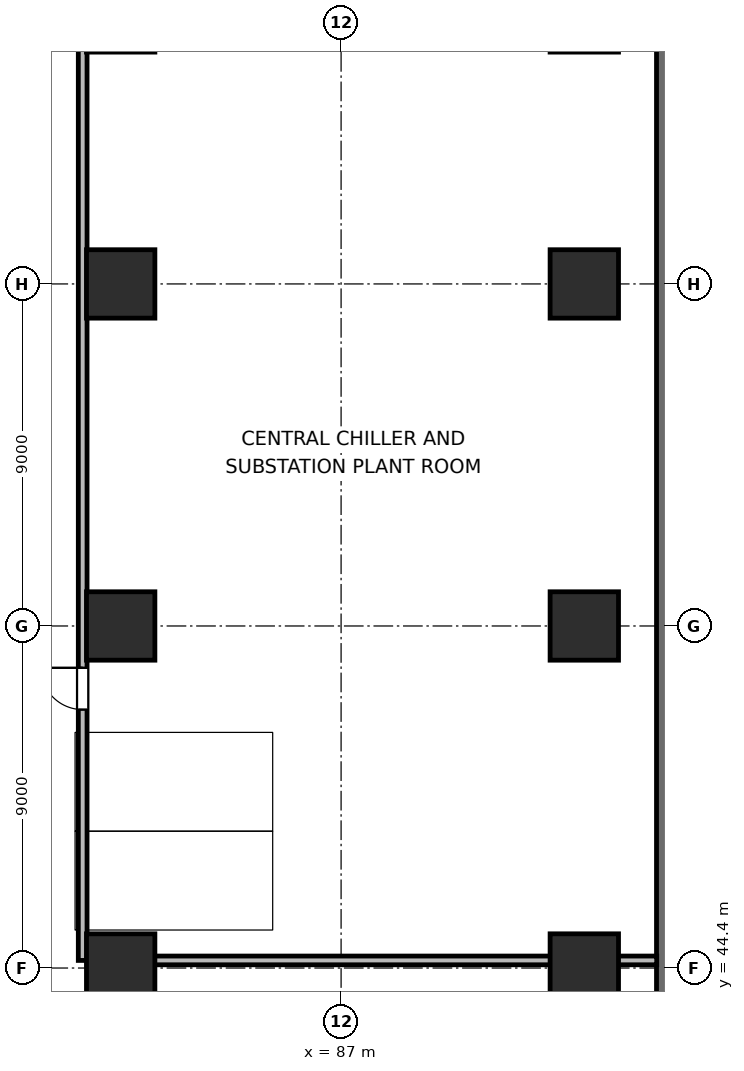
"""IFC4 building model, lengths in metres.
Left out: names, types, materials, properties, quantities, classifications, styles, units other than length and angle.
Written with IfcOpenShell. Run it as: python <this file> out.ifc"""

import sys

from ifc_helpers import new_model, si_unit, direction, frame, frame_2d, origin, origin_2d, place, context, subcontext, project, spatial, rectangle, extrude, element, fill, save


model = new_model("IFC4")
c1 = context("Model", 3, precision=1e-05, world=origin(), true_north=direction((0.0, 1.0)))
c2 = subcontext(c1, "Body", "Model", "MODEL_VIEW")
j1 = project(units=[si_unit("LENGTHUNIT", "METRE"), si_unit("PLANEANGLEUNIT", "RADIAN")], contexts=[c1])
p1 = place(None, origin())
s1 = spatial("IfcSite", under=j1, at=p1, CompositionType="ELEMENT")
p2 = place(p1, origin())
s2 = spatial("IfcBuilding", under=s1, at=p2, CompositionType="ELEMENT")
p3 = place(p2, frame((0.0, 0.0, -9.0)))
s3 = spatial("IfcBuildingStorey", under=s2, at=p3, CompositionType="ELEMENT", Elevation=-9.0)
p4 = place(p3, frame((95.65, 0.7, 0.0), z_axis=(0.0, 0.0, 1.0), x_axis=(0.0, 1.0, 0.0)))
e1 = element("IfcWall", 1, at=p4, inside=s3, PredefinedType="SOLIDWALL", context=c2, shape_type="SweptSolid", body=[
    extrude(rectangle(XDim=70.6, YDim=0.7, at=frame_2d((35.3, 0.0))), origin(), (0.0, 0.0, 1.0), 4.5),
])
for number, where, z_axis, x_axis in (
    (2, (81.2, 44.4, 0.0), (0.0, 0.0, 1.0), (1.0, 0.0, 0.0)),
    (3, (81.2, 53.4, 0.0), (0.0, 0.0, 1.0), (1.0, 0.0, 0.0)),
    (4, (81.2, 62.4, 0.0), (0.0, 0.0, 1.0), (1.0, 0.0, 0.0)),
    (5, (81.2, 69.4, 0.0), (0.0, 0.0, 1.0), (1.0, 0.0, 0.0)),
    (6, (93.4, 44.4, 0.0), (0.0, 0.0, 1.0), (1.0, 0.0, 0.0)),
    (7, (93.4, 53.4, 0.0), (0.0, 0.0, 1.0), (1.0, 0.0, 0.0)),
    (8, (93.4, 62.4, 0.0), (0.0, 0.0, 1.0), (1.0, 0.0, 0.0)),
    (9, (93.4, 69.4, 0.0), (0.0, 0.0, 1.0), (1.0, 0.0, 0.0)),
):
    element("IfcColumn", number, at=place(p3, frame(where, z_axis=z_axis, x_axis=x_axis)), inside=s3, PredefinedType="COLUMN", context=c2, shape_type="SweptSolid", body=[
        extrude(rectangle(XDim=1.8, YDim=1.8, at=origin_2d()), origin(), (0.0, 0.0, 1.0), 4.5),
    ])
p5 = place(p3, frame((80.2, 44.6, 0.0), z_axis=(0.0, 0.0, 1.0), x_axis=(0.0, 1.0, 0.0)))
e10 = element("IfcWall", 10, at=p5, inside=s3, PredefinedType="PARTITIONING", context=c2, shape_type="SweptSolid", body=[
    extrude(rectangle(XDim=26.705, YDim=0.23, at=frame_2d((13.353, 0.0))), origin(), (0.0, 0.0, 1.0), 4.18),
])
p6 = place(p5, frame((6.6, 0.0, 0.0)))
e11 = element("IfcOpeningElement", 11, at=p6, cuts=e10, PredefinedType="OPENING", context=c2, shape_type="SweptSolid", body=[
    extrude(rectangle(XDim=1.1, YDim=2.05, at=frame_2d((0.55, 1.025))), frame((0.0, 0.125, 0.0), z_axis=(0.0, -1.0, 0.0), x_axis=(1.0, 0.0, 0.0)), (0.0, 0.0, 1.0), 0.25),
])
p7 = place(p3, frame((80.317, 44.6, 0.0), z_axis=(0.0, 0.0, 1.0), x_axis=(1.0, 0.0, 0.0)))
e12 = element("IfcWall", 12, at=p7, inside=s3, PredefinedType="PARTITIONING", context=c2, shape_type="SweptSolid", body=[
    extrude(rectangle(XDim=14.988, YDim=0.23, at=frame_2d((7.494, 0.0))), origin(), (0.0, 0.0, 1.0), 3.31),
])
p8 = place(p6, origin())
e13 = element("IfcDoor", 13, at=p8, inside=s3, OperationType="SINGLE_SWING_RIGHT", PredefinedType="DOOR", context=c2, shape_type="SweptSolid", body=[
    extrude(rectangle(XDim=1.1, YDim=2.05, at=frame_2d((0.55, 1.025))), frame((0.0, 0.025, 0.0), z_axis=(0.0, -1.0, 0.0), x_axis=(1.0, 0.0, 0.0)), (0.0, 0.0, 1.0), 0.05),
])
fill(e11, e13)
save(model, sys.argv[1])
